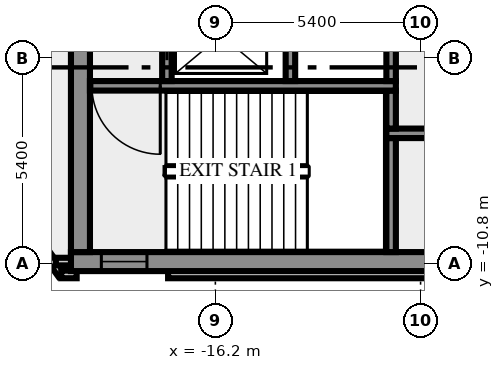
"""IFC4 building model, lengths in metres.
Left out: names, types, materials, properties, quantities, classifications, styles, units other than length and angle.
Written with IfcOpenShell. Run it as: python <this file> out.ifc"""

import sys

from ifc_helpers import new_model, si_unit, direction, frame, frame_2d, origin, place, context, subcontext, project, spatial, rectangle, extrude, element, fill, save


model = new_model("IFC4")
c1 = context("Model", 3, precision=1e-05, world=origin(), true_north=direction((0.0, 1.0)))
c2 = subcontext(c1, "Body", "Model", "MODEL_VIEW")
j1 = project(units=[si_unit("LENGTHUNIT", "METRE"), si_unit("PLANEANGLEUNIT", "RADIAN")], contexts=[c1])
p1 = place(None, origin())
s1 = spatial("IfcSite", under=j1, at=p1, CompositionType="ELEMENT")
p2 = place(p1, origin())
s2 = spatial("IfcBuilding", under=s1, at=p2, CompositionType="ELEMENT")
p3 = place(p2, frame((0.0, 0.0, 184.0)))
s3 = spatial("IfcBuildingStorey", under=s2, at=p3, CompositionType="ELEMENT", Elevation=184.0)
p4 = place(p3, frame((-21.833, -8.909, 0.0), z_axis=(0.0, 0.0, 1.0), x_axis=(0.587766567315, -0.809030569476, 0.0)))
e1 = element("IfcWall", 1, at=p4, inside=s3, PredefinedType="SOLIDWALL", context=c2, shape_type="SweptSolid", body=[
    extrude(rectangle(XDim=2.688, YDim=0.2, at=frame_2d((1.344, 0.0))), origin(), (0.0, 0.0, 1.0), 3.4),
])
p5 = place(p3, frame((-20.256, -11.088, 0.0), z_axis=(0.0, 0.0, 1.0), x_axis=(1.0, 0.0, 0.0)))
e2 = element("IfcWall", 2, at=p5, inside=s3, PredefinedType="SOLIDWALL", context=c2, shape_type="SweptSolid", body=[
    extrude(rectangle(XDim=0.406, YDim=0.2, at=frame_2d((0.203, 0.0))), origin(), (0.0, 0.0, 1.0), 3.4),
])
p6 = place(p3, frame((-17.444, -11.088, 0.0), z_axis=(0.0, 0.0, 1.0), x_axis=(1.0, 0.0, 0.0)))
e3 = element("IfcWall", 3, at=p6, inside=s3, PredefinedType="SOLIDWALL", context=c2, shape_type="SweptSolid", body=[
    extrude(rectangle(XDim=34.888, YDim=0.2, at=frame_2d((17.444, 0.0))), origin(), (0.0, 0.0, 1.0), 3.4),
])
p7 = place(p3, frame((-19.98, -10.75, 0.0), z_axis=(0.0, 0.0, 1.0), x_axis=(-1.0, 0.0, 0.0)))
e4 = element("IfcWall", 4, at=p7, inside=s3, PredefinedType="SOLIDWALL", context=c2, shape_type="SweptSolid", body=[
    extrude(rectangle(XDim=0.417, YDim=0.2, at=frame_2d((0.208, 0.0))), origin(), (0.0, 0.0, 1.0), 3.4),
])
p8 = place(p3, frame((-20.0, -10.75, 0.0), z_axis=(0.0, 0.0, 1.0), x_axis=(1.0, 0.0, 0.0)))
e5 = element("IfcWall", 5, at=p8, inside=s3, PredefinedType="SHEAR", context=c2, shape_type="SweptSolid", body=[
    extrude(rectangle(XDim=40.0, YDim=0.5, at=frame_2d((20.0, 0.0))), origin(), (0.0, 0.0, 1.0), 3.4),
])
p9 = place(p8, frame((0.8, 0.0, 1.0)))
e6 = element("IfcOpeningElement", 6, at=p9, cuts=e5, PredefinedType="OPENING", context=c2, shape_type="SweptSolid", body=[
    extrude(rectangle(XDim=1.2, YDim=1.2, at=frame_2d((0.6, 0.6))), frame((0.0, 0.26, 0.0), z_axis=(0.0, -1.0, 0.0), x_axis=(1.0, 0.0, 0.0)), (0.0, 0.0, 1.0), 0.52),
])
p10 = place(p8, frame((38.0, 0.0, 1.0)))
e7 = element("IfcOpeningElement", 7, at=p10, cuts=e5, PredefinedType="OPENING", context=c2, shape_type="SweptSolid", body=[
    extrude(rectangle(XDim=1.2, YDim=1.2, at=frame_2d((0.6, 0.6))), frame((0.0, 0.26, 0.0), z_axis=(0.0, -1.0, 0.0), x_axis=(1.0, 0.0, 0.0)), (0.0, 0.0, 1.0), 0.52),
])
p11 = place(p3, frame((-19.75, -10.5, 0.0), z_axis=(0.0, 0.0, 1.0), x_axis=(0.0, 1.0, 0.0)))
e8 = element("IfcWall", 8, at=p11, inside=s3, PredefinedType="SHEAR", context=c2, shape_type="SweptSolid", body=[
    extrude(rectangle(XDim=8.8, YDim=0.5, at=frame_2d((4.4, 0.0))), origin(), (0.0, 0.0, 1.0), 3.4),
])
p12 = place(p3, frame((-11.575, -10.5, 0.0), z_axis=(0.0, 0.0, 1.0), x_axis=(0.0, 1.0, 0.0)))
e9 = element("IfcWall", 9, at=p12, inside=s3, PredefinedType="SHEAR", context=c2, shape_type="SweptSolid", body=[
    extrude(rectangle(XDim=3.0, YDim=0.25, at=frame_2d((1.5, 0.0))), origin(), (0.0, 0.0, 1.0), 3.4),
])
p13 = place(p3, frame((11.7, -7.375, 0.0), z_axis=(0.0, 0.0, 1.0), x_axis=(-1.0, 0.0, 0.0)))
e10 = element("IfcWall", 10, at=p13, inside=s3, PredefinedType="SHEAR", context=c2, shape_type="SweptSolid", body=[
    extrude(rectangle(XDim=23.4, YDim=0.25, at=frame_2d((11.7, 0.0))), origin(), (0.0, 0.0, 1.0), 3.4),
])
p14 = place(p13, frame((20.613, 0.0, 0.0)))
e11 = element("IfcOpeningElement", 11, at=p14, cuts=e10, PredefinedType="OPENING", context=c2, shape_type="SweptSolid", body=[
    extrude(rectangle(XDim=0.9, YDim=2.1, at=frame_2d((0.45, 1.05))), frame((0.0, 0.135, 0.0), z_axis=(0.0, -1.0, 0.0), x_axis=(1.0, 0.0, 0.0)), (0.0, 0.0, 1.0), 0.27),
])
p15 = place(p13, frame((16.888, 0.0, 0.0)))
e12 = element("IfcOpeningElement", 12, at=p15, cuts=e10, PredefinedType="OPENING", context=c2, shape_type="SweptSolid", body=[
    extrude(rectangle(XDim=0.9, YDim=2.1, at=frame_2d((0.45, 1.05))), frame((0.0, 0.135, 0.0), z_axis=(0.0, -1.0, 0.0), x_axis=(1.0, 0.0, 0.0)), (0.0, 0.0, 1.0), 0.27),
])
p16 = place(p13, frame((14.25, 0.0, 0.0)))
e13 = element("IfcOpeningElement", 13, at=p16, cuts=e10, PredefinedType="OPENING", context=c2, shape_type="SweptSolid", body=[
    extrude(rectangle(XDim=0.9, YDim=2.1, at=frame_2d((0.45, 1.05))), frame((0.0, 0.135, 0.0), z_axis=(0.0, -1.0, 0.0), x_axis=(1.0, 0.0, 0.0)), (0.0, 0.0, 1.0), 0.27),
])
p17 = place(p13, frame((12.125, 0.0, 0.0)))
e14 = element("IfcOpeningElement", 14, at=p17, cuts=e10, PredefinedType="OPENING", context=c2, shape_type="SweptSolid", body=[
    extrude(rectangle(XDim=0.9, YDim=2.1, at=frame_2d((0.45, 1.05))), frame((0.0, 0.135, 0.0), z_axis=(0.0, -1.0, 0.0), x_axis=(1.0, 0.0, 0.0)), (0.0, 0.0, 1.0), 0.27),
])
p18 = place(p13, frame((10.45, 0.0, 0.0)))
e15 = element("IfcOpeningElement", 15, at=p18, cuts=e10, PredefinedType="OPENING", context=c2, shape_type="SweptSolid", body=[
    extrude(rectangle(XDim=0.75, YDim=2.1, at=frame_2d((0.375, 1.05))), frame((0.0, 0.135, 0.0), z_axis=(0.0, -1.0, 0.0), x_axis=(1.0, 0.0, 0.0)), (0.0, 0.0, 1.0), 0.27),
])
p19 = place(p13, frame((8.35, 0.0, 0.0)))
e16 = element("IfcOpeningElement", 16, at=p19, cuts=e10, PredefinedType="OPENING", context=c2, shape_type="SweptSolid", body=[
    extrude(rectangle(XDim=1.1, YDim=2.1, at=frame_2d((0.55, 1.05))), frame((0.0, 0.135, 0.0), z_axis=(0.0, -1.0, 0.0), x_axis=(1.0, 0.0, 0.0)), (0.0, 0.0, 1.0), 0.27),
])
p20 = place(p13, frame((5.85, 0.0, 0.0)))
e17 = element("IfcOpeningElement", 17, at=p20, cuts=e10, PredefinedType="OPENING", context=c2, shape_type="SweptSolid", body=[
    extrude(rectangle(XDim=1.1, YDim=2.1, at=frame_2d((0.55, 1.05))), frame((0.0, 0.135, 0.0), z_axis=(0.0, -1.0, 0.0), x_axis=(1.0, 0.0, 0.0)), (0.0, 0.0, 1.0), 0.27),
])
p21 = place(p13, frame((3.35, 0.0, 0.0)))
e18 = element("IfcOpeningElement", 18, at=p21, cuts=e10, PredefinedType="OPENING", context=c2, shape_type="SweptSolid", body=[
    extrude(rectangle(XDim=1.1, YDim=2.1, at=frame_2d((0.55, 1.05))), frame((0.0, 0.135, 0.0), z_axis=(0.0, -1.0, 0.0), x_axis=(1.0, 0.0, 0.0)), (0.0, 0.0, 1.0), 0.27),
])
p22 = place(p13, frame((0.85, 0.0, 0.0)))
e19 = element("IfcOpeningElement", 19, at=p22, cuts=e10, PredefinedType="OPENING", context=c2, shape_type="SweptSolid", body=[
    extrude(rectangle(XDim=1.1, YDim=2.1, at=frame_2d((0.55, 1.05))), frame((0.0, 0.135, 0.0), z_axis=(0.0, -1.0, 0.0), x_axis=(1.0, 0.0, 0.0)), (0.0, 0.0, 1.0), 0.27),
])
p23 = place(p3, frame((-11.575, -7.25, 0.0), z_axis=(0.0, 0.0, 1.0), x_axis=(0.0, 1.0, 0.0)))
e20 = element("IfcWall", 20, at=p23, inside=s3, PredefinedType="SHEAR", context=c2, shape_type="SweptSolid", body=[
    extrude(rectangle(XDim=1.0, YDim=0.25, at=frame_2d((0.5, 0.0))), origin(), (0.0, 0.0, 1.0), 3.4),
])
p24 = place(p3, frame((-11.45, -6.125, 0.0), z_axis=(0.0, 0.0, 1.0), x_axis=(-1.0, 0.0, 0.0)))
e21 = element("IfcWall", 21, at=p24, inside=s3, PredefinedType="SHEAR", context=c2, shape_type="SweptSolid", body=[
    extrude(rectangle(XDim=8.05, YDim=0.25, at=frame_2d((4.025, 0.0))), origin(), (0.0, 0.0, 1.0), 3.4),
])
p25 = place(p24, frame((6.2, 0.0, 0.0)))
e22 = element("IfcOpeningElement", 22, at=p25, cuts=e21, PredefinedType="OPENING", context=c2, shape_type="SweptSolid", body=[
    extrude(rectangle(XDim=1.8, YDim=2.1, at=frame_2d((0.9, 1.05))), frame((0.0, 0.135, 0.0), z_axis=(0.0, -1.0, 0.0), x_axis=(1.0, 0.0, 0.0)), (0.0, 0.0, 1.0), 0.27),
])
p26 = place(p3, frame((-17.475, -6.0, 0.0), z_axis=(0.0, 0.0, 1.0), x_axis=(0.0, 1.0, 0.0)))
e23 = element("IfcWall", 23, at=p26, inside=s3, PredefinedType="SHEAR", context=c2, shape_type="SweptSolid", body=[
    extrude(rectangle(XDim=4.3, YDim=0.25, at=frame_2d((2.15, 0.0))), origin(), (0.0, 0.0, 1.0), 3.4),
])
p27 = place(p26, frame((0.55, 0.0, 0.0)))
e24 = element("IfcOpeningElement", 24, at=p27, cuts=e23, PredefinedType="OPENING", context=c2, shape_type="SweptSolid", body=[
    extrude(rectangle(XDim=1.3, YDim=2.1, at=frame_2d((0.65, 1.05))), frame((0.0, 0.135, 0.0), z_axis=(0.0, -1.0, 0.0), x_axis=(1.0, 0.0, 0.0)), (0.0, 0.0, 1.0), 0.27),
])
p28 = place(p3, frame((-14.225, -6.0, 0.0), z_axis=(0.0, 0.0, 1.0), x_axis=(0.0, 1.0, 0.0)))
e25 = element("IfcWall", 25, at=p28, inside=s3, PredefinedType="SHEAR", context=c2, shape_type="SweptSolid", body=[
    extrude(rectangle(XDim=4.3, YDim=0.25, at=frame_2d((2.15, 0.0))), origin(), (0.0, 0.0, 1.0), 3.4),
])
p29 = place(p3, frame((-11.575, -6.0, 0.0), z_axis=(0.0, 0.0, 1.0), x_axis=(0.0, 1.0, 0.0)))
e26 = element("IfcWall", 26, at=p29, inside=s3, PredefinedType="SHEAR", context=c2, shape_type="SweptSolid", body=[
    extrude(rectangle(XDim=1.75, YDim=0.25, at=frame_2d((0.875, 0.0))), origin(), (0.0, 0.0, 1.0), 3.4),
])
p30 = place(p9, origin())
e27 = element("IfcWindow", 27, at=p30, inside=s3, PartitioningType="SINGLE_PANEL", PredefinedType="WINDOW", context=c2, shape_type="SweptSolid", body=[
    extrude(rectangle(XDim=1.2, YDim=1.2, at=frame_2d((0.6, 0.6))), frame((0.0, 0.03, 0.0), z_axis=(0.0, -1.0, 0.0), x_axis=(1.0, 0.0, 0.0)), (0.0, 0.0, 1.0), 0.06),
])
fill(e6, e27)
p31 = place(p25, origin())
e28 = element("IfcDoor", 28, at=p31, inside=s3, OperationType="DOUBLE_DOOR_SINGLE_SWING", PredefinedType="DOOR", context=c2, shape_type="SweptSolid", body=[
    extrude(rectangle(XDim=1.8, YDim=2.1, at=frame_2d((0.9, 1.05))), frame((0.0, 0.025, 0.0), z_axis=(0.0, -1.0, 0.0), x_axis=(1.0, 0.0, 0.0)), (0.0, 0.0, 1.0), 0.05),
])
fill(e22, e28)
p32 = place(p27, origin())
e29 = element("IfcDoor", 29, at=p32, inside=s3, OperationType="DOUBLE_DOOR_SLIDING", PredefinedType="DOOR", context=c2, shape_type="SweptSolid", body=[
    extrude(rectangle(XDim=1.3, YDim=2.1, at=frame_2d((0.65, 1.05))), frame((0.0, 0.025, 0.0), z_axis=(0.0, -1.0, 0.0), x_axis=(1.0, 0.0, 0.0)), (0.0, 0.0, 1.0), 0.05),
])
fill(e24, e29)
save(model, sys.argv[1])
